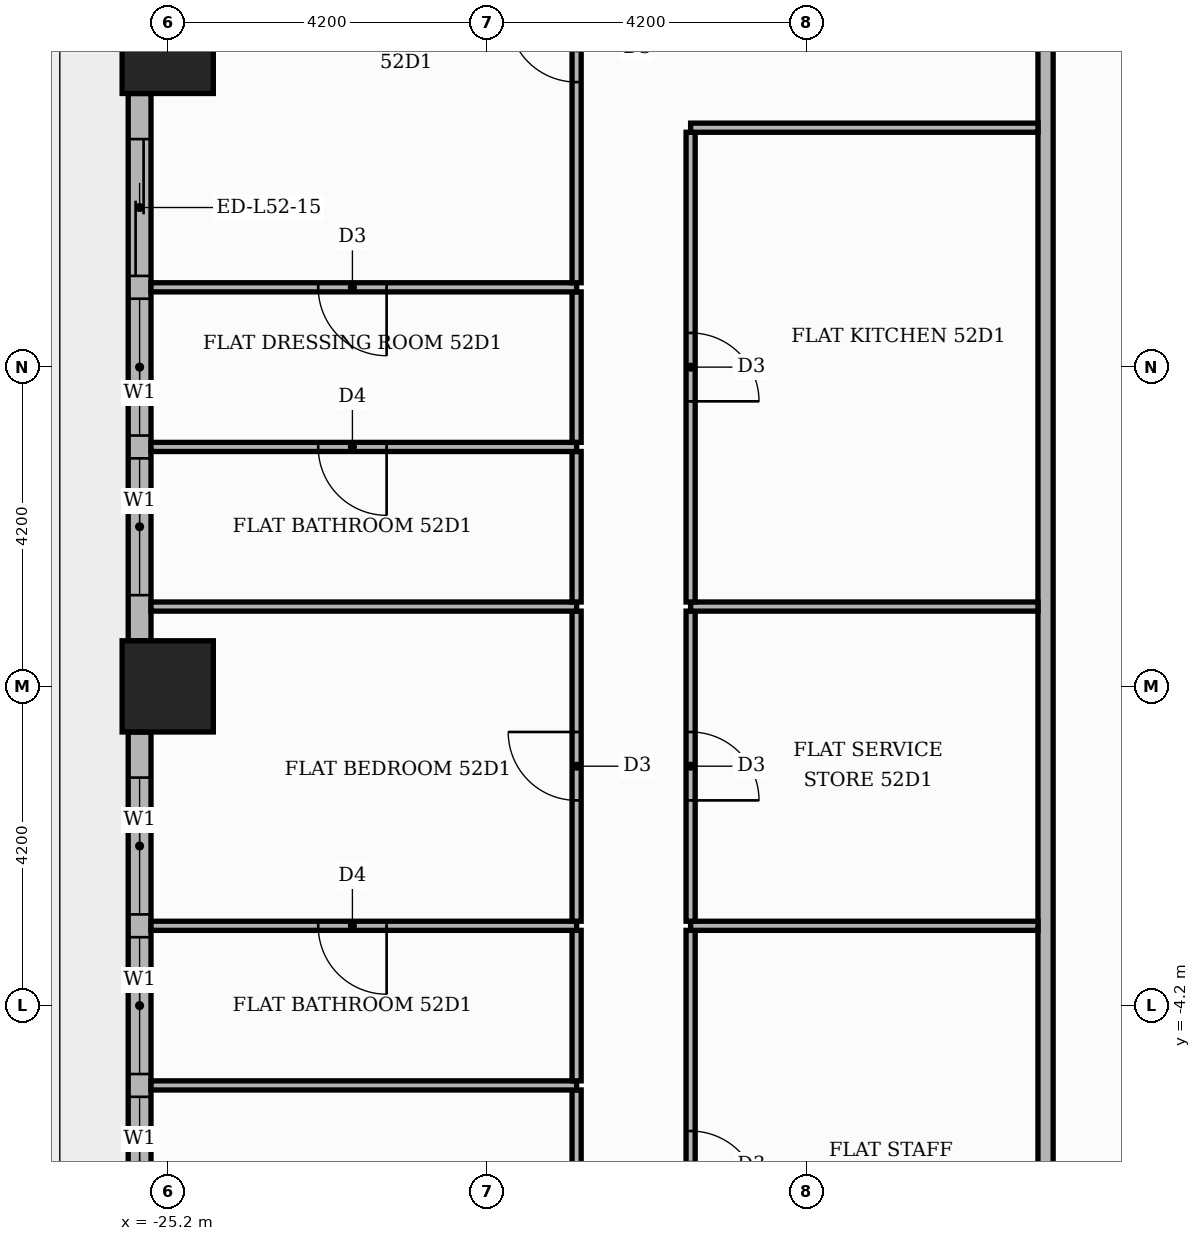
"""IFC4 building model, lengths in metres.
Left out: names, types, materials, properties, quantities, classifications, styles, units other than length and angle.
Written with IfcOpenShell. Run it as: python <this file> out.ifc"""

import sys

from ifc_helpers import new_model, si_unit, direction, frame, frame_2d, origin, origin_2d, place, context, subcontext, project, spatial, rectangle, extrude, element, fill, save


model = new_model("IFC4")
c1 = context("Model", 3, precision=1e-05, world=origin(), true_north=direction((0.0, 1.0)))
c2 = subcontext(c1, "Body", "Model", "MODEL_VIEW")
j1 = project(units=[si_unit("LENGTHUNIT", "METRE"), si_unit("PLANEANGLEUNIT", "RADIAN")], contexts=[c1])
p1 = place(None, origin())
s1 = spatial("IfcSite", under=j1, at=p1, CompositionType="ELEMENT")
p2 = place(p1, origin())
s2 = spatial("IfcBuilding", under=s1, at=p2, CompositionType="ELEMENT")
p3 = place(p2, frame((0.0, 0.0, 219.6)))
s3 = spatial("IfcBuildingStorey", under=s2, at=p3, CompositionType="ELEMENT", Elevation=219.6)
for number, where, z_axis, x_axis in (
    (1, (-25.2, 0.0, 0.0), (0.0, 0.0, 1.0), (1.0, 0.0, 0.0)),
    (2, (-25.2, 8.4, 0.0), (0.0, 0.0, 1.0), (1.0, 0.0, 0.0)),
):
    element("IfcColumn", number, at=place(p3, frame(where, z_axis=z_axis, x_axis=x_axis)), inside=s3, PredefinedType="COLUMN", context=c2, shape_type="SweptSolid", body=[
        extrude(rectangle(XDim=1.2, YDim=1.2, at=origin_2d()), origin(), (0.0, 0.0, 1.0), 3.9),
    ])
p4 = place(p3, frame((-25.57, 7.8, 0.0), z_axis=(0.0, 0.0, 1.0), x_axis=(0.0, -1.0, 0.0)))
e3 = element("IfcWall", 3, at=p4, inside=s3, PredefinedType="STANDARD", context=c2, shape_type="SweptSolid", body=[
    extrude(rectangle(XDim=7.2, YDim=0.3, at=frame_2d((3.6, 0.0))), origin(), (0.0, 0.0, 1.0), 3.48),
])
p5 = place(p4, frame((0.6, 0.0, 0.0)))
e4 = element("IfcOpeningElement", 4, at=p5, cuts=e3, PredefinedType="OPENING", context=c2, shape_type="SweptSolid", body=[
    extrude(rectangle(XDim=1.8, YDim=2.4, at=frame_2d((0.9, 1.2))), frame((0.0, 0.16, 0.0), z_axis=(0.0, -1.0, 0.0), x_axis=(1.0, 0.0, 0.0)), (0.0, 0.0, 1.0), 0.32),
])
p6 = place(p4, frame((2.7, 0.0, 0.9)))
e5 = element("IfcOpeningElement", 5, at=p6, cuts=e3, PredefinedType="OPENING", context=c2, shape_type="SweptSolid", body=[
    extrude(rectangle(XDim=1.8, YDim=2.1, at=frame_2d((0.9, 1.05))), frame((0.0, 0.16, 0.0), z_axis=(0.0, -1.0, 0.0), x_axis=(1.0, 0.0, 0.0)), (0.0, 0.0, 1.0), 0.32),
])
p7 = place(p4, frame((4.8, 0.0, 0.9)))
e6 = element("IfcOpeningElement", 6, at=p7, cuts=e3, PredefinedType="OPENING", context=c2, shape_type="SweptSolid", body=[
    extrude(rectangle(XDim=1.8, YDim=2.1, at=frame_2d((0.9, 1.05))), frame((0.0, 0.16, 0.0), z_axis=(0.0, -1.0, 0.0), x_axis=(1.0, 0.0, 0.0)), (0.0, 0.0, 1.0), 0.32),
])
p8 = place(p3, frame((-25.57, -0.6, 0.0), z_axis=(0.0, 0.0, 1.0), x_axis=(0.0, -1.0, 0.0)))
e7 = element("IfcWall", 7, at=p8, inside=s3, PredefinedType="STANDARD", context=c2, shape_type="SweptSolid", body=[
    extrude(rectangle(XDim=7.2, YDim=0.3, at=frame_2d((3.6, 0.0))), origin(), (0.0, 0.0, 1.0), 3.48),
])
p9 = place(p8, frame((0.6, 0.0, 0.9)))
e8 = element("IfcOpeningElement", 8, at=p9, cuts=e7, PredefinedType="OPENING", context=c2, shape_type="SweptSolid", body=[
    extrude(rectangle(XDim=1.8, YDim=2.1, at=frame_2d((0.9, 1.05))), frame((0.0, 0.16, 0.0), z_axis=(0.0, -1.0, 0.0), x_axis=(1.0, 0.0, 0.0)), (0.0, 0.0, 1.0), 0.32),
])
p10 = place(p8, frame((2.7, 0.0, 0.9)))
e9 = element("IfcOpeningElement", 9, at=p10, cuts=e7, PredefinedType="OPENING", context=c2, shape_type="SweptSolid", body=[
    extrude(rectangle(XDim=1.8, YDim=2.1, at=frame_2d((0.9, 1.05))), frame((0.0, 0.16, 0.0), z_axis=(0.0, -1.0, 0.0), x_axis=(1.0, 0.0, 0.0)), (0.0, 0.0, 1.0), 0.32),
])
p11 = place(p8, frame((4.8, 0.0, 0.9)))
e10 = element("IfcOpeningElement", 10, at=p11, cuts=e7, PredefinedType="OPENING", context=c2, shape_type="SweptSolid", body=[
    extrude(rectangle(XDim=1.8, YDim=2.1, at=frame_2d((0.9, 1.05))), frame((0.0, 0.16, 0.0), z_axis=(0.0, -1.0, 0.0), x_axis=(1.0, 0.0, 0.0)), (0.0, 0.0, 1.0), 0.32),
])
p12 = place(p3, frame((-13.65, -13.55, 0.0), z_axis=(0.0, 0.0, 1.0), x_axis=(0.0, 1.0, 0.0)))
e11 = element("IfcWall", 11, at=p12, inside=s3, PredefinedType="PARTITIONING", context=c2, shape_type="SweptSolid", body=[
    extrude(rectangle(XDim=27.1, YDim=0.2, at=frame_2d((13.55, 0.0))), origin(), (0.0, 0.0, 1.0), 3.48),
])
p13 = place(p12, frame((23.5, 0.0, 0.0)))
e12 = element("IfcOpeningElement", 12, at=p13, cuts=e11, PredefinedType="OPENING", context=c2, shape_type="SweptSolid", body=[
    extrude(rectangle(XDim=1.1, YDim=2.4, at=frame_2d((0.55, 1.2))), frame((0.0, 0.11, 0.0), z_axis=(0.0, -1.0, 0.0), x_axis=(1.0, 0.0, 0.0)), (0.0, 0.0, 1.0), 0.22),
])
p14 = place(p3, frame((-19.82, -11.49, 0.0), z_axis=(0.0, 0.0, 1.0), x_axis=(0.0, 1.0, 0.0)))
e13 = element("IfcWall", 13, at=p14, inside=s3, PredefinedType="PARTITIONING", context=c2, shape_type="SweptSolid", body=[
    extrude(rectangle(XDim=6.18, YDim=0.12, at=frame_2d((3.09, 0.0))), origin(), (0.0, 0.0, 1.0), 3.48),
])
p15 = place(p14, frame((2.64, 0.0, 0.0)))
e14 = element("IfcOpeningElement", 14, at=p15, cuts=e13, PredefinedType="OPENING", context=c2, shape_type="SweptSolid", body=[
    extrude(rectangle(XDim=0.9, YDim=2.1, at=frame_2d((0.45, 1.05))), frame((0.0, 0.07, 0.0), z_axis=(0.0, -1.0, 0.0), x_axis=(1.0, 0.0, 0.0)), (0.0, 0.0, 1.0), 0.14),
])
p16 = place(p3, frame((-18.32, -9.39, 0.0), z_axis=(0.0, 0.0, 1.0), x_axis=(0.0, 1.0, 0.0)))
e15 = element("IfcWall", 15, at=p16, inside=s3, PredefinedType="PARTITIONING", context=c2, shape_type="SweptSolid", body=[
    extrude(rectangle(XDim=6.18, YDim=0.12, at=frame_2d((3.09, 0.0))), origin(), (0.0, 0.0, 1.0), 3.48),
])
p17 = place(p16, frame((2.64, 0.0, 0.0)))
e16 = element("IfcOpeningElement", 16, at=p17, cuts=e15, PredefinedType="OPENING", context=c2, shape_type="SweptSolid", body=[
    extrude(rectangle(XDim=0.9, YDim=2.1, at=frame_2d((0.45, 1.05))), frame((0.0, 0.07, 0.0), z_axis=(0.0, -1.0, 0.0), x_axis=(1.0, 0.0, 0.0)), (0.0, 0.0, 1.0), 0.14),
])
p18 = place(p3, frame((-25.42, -5.25, 0.0), z_axis=(0.0, 0.0, 1.0), x_axis=(1.0, 0.0, 0.0)))
e17 = element("IfcWall", 17, at=p18, inside=s3, PredefinedType="PARTITIONING", context=c2, shape_type="SweptSolid", body=[
    extrude(rectangle(XDim=5.6, YDim=0.12, at=frame_2d((2.8, 0.0))), origin(), (0.0, 0.0, 1.0), 3.48),
])
p19 = place(p3, frame((-19.82, -5.19, 0.0), z_axis=(0.0, 0.0, 1.0), x_axis=(0.0, 1.0, 0.0)))
e18 = element("IfcWall", 18, at=p19, inside=s3, PredefinedType="PARTITIONING", context=c2, shape_type="SweptSolid", body=[
    extrude(rectangle(XDim=1.98, YDim=0.12, at=frame_2d((0.99, 0.0))), origin(), (0.0, 0.0, 1.0), 3.48),
])
p20 = place(p3, frame((-25.42, -3.15, 0.0), z_axis=(0.0, 0.0, 1.0), x_axis=(1.0, 0.0, 0.0)))
e19 = element("IfcWall", 19, at=p20, inside=s3, PredefinedType="PARTITIONING", context=c2, shape_type="SweptSolid", body=[
    extrude(rectangle(XDim=5.6, YDim=0.12, at=frame_2d((2.8, 0.0))), origin(), (0.0, 0.0, 1.0), 3.48),
])
p21 = place(p20, frame((2.2, 0.0, 0.0)))
e20 = element("IfcOpeningElement", 20, at=p21, cuts=e19, PredefinedType="OPENING", context=c2, shape_type="SweptSolid", body=[
    extrude(rectangle(XDim=0.9, YDim=2.1, at=frame_2d((0.45, 1.05))), frame((0.0, 0.07, 0.0), z_axis=(0.0, -1.0, 0.0), x_axis=(1.0, 0.0, 0.0)), (0.0, 0.0, 1.0), 0.14),
])
p22 = place(p3, frame((-18.32, -3.15, 0.0), z_axis=(0.0, 0.0, 1.0), x_axis=(1.0, 0.0, 0.0)))
e21 = element("IfcWall", 21, at=p22, inside=s3, PredefinedType="PARTITIONING", context=c2, shape_type="SweptSolid", body=[
    extrude(rectangle(XDim=4.57, YDim=0.12, at=frame_2d((2.285, 0.0))), origin(), (0.0, 0.0, 1.0), 3.48),
])
p23 = place(p3, frame((-19.82, -3.09, 0.0), z_axis=(0.0, 0.0, 1.0), x_axis=(0.0, 1.0, 0.0)))
e22 = element("IfcWall", 22, at=p23, inside=s3, PredefinedType="PARTITIONING", context=c2, shape_type="SweptSolid", body=[
    extrude(rectangle(XDim=4.08, YDim=0.12, at=frame_2d((2.04, 0.0))), origin(), (0.0, 0.0, 1.0), 3.48),
])
p24 = place(p23, frame((1.59, 0.0, 0.0)))
e23 = element("IfcOpeningElement", 23, at=p24, cuts=e22, PredefinedType="OPENING", context=c2, shape_type="SweptSolid", body=[
    extrude(rectangle(XDim=0.9, YDim=2.1, at=frame_2d((0.45, 1.05))), frame((0.0, 0.07, 0.0), z_axis=(0.0, -1.0, 0.0), x_axis=(1.0, 0.0, 0.0)), (0.0, 0.0, 1.0), 0.14),
])
p25 = place(p3, frame((-18.32, -3.09, 0.0), z_axis=(0.0, 0.0, 1.0), x_axis=(0.0, 1.0, 0.0)))
e24 = element("IfcWall", 24, at=p25, inside=s3, PredefinedType="PARTITIONING", context=c2, shape_type="SweptSolid", body=[
    extrude(rectangle(XDim=4.08, YDim=0.12, at=frame_2d((2.04, 0.0))), origin(), (0.0, 0.0, 1.0), 3.48),
])
p26 = place(p25, frame((1.59, 0.0, 0.0)))
e25 = element("IfcOpeningElement", 25, at=p26, cuts=e24, PredefinedType="OPENING", context=c2, shape_type="SweptSolid", body=[
    extrude(rectangle(XDim=0.9, YDim=2.1, at=frame_2d((0.45, 1.05))), frame((0.0, 0.07, 0.0), z_axis=(0.0, -1.0, 0.0), x_axis=(1.0, 0.0, 0.0)), (0.0, 0.0, 1.0), 0.14),
])
p27 = place(p3, frame((-25.42, 1.05, 0.0), z_axis=(0.0, 0.0, 1.0), x_axis=(1.0, 0.0, 0.0)))
e26 = element("IfcWall", 26, at=p27, inside=s3, PredefinedType="PARTITIONING", context=c2, shape_type="SweptSolid", body=[
    extrude(rectangle(XDim=5.6, YDim=0.12, at=frame_2d((2.8, 0.0))), origin(), (0.0, 0.0, 1.0), 3.48),
])
p28 = place(p3, frame((-18.32, 1.05, 0.0), z_axis=(0.0, 0.0, 1.0), x_axis=(1.0, 0.0, 0.0)))
e27 = element("IfcWall", 27, at=p28, inside=s3, PredefinedType="PARTITIONING", context=c2, shape_type="SweptSolid", body=[
    extrude(rectangle(XDim=4.57, YDim=0.12, at=frame_2d((2.285, 0.0))), origin(), (0.0, 0.0, 1.0), 3.48),
])
p29 = place(p3, frame((-19.82, 1.11, 0.0), z_axis=(0.0, 0.0, 1.0), x_axis=(0.0, 1.0, 0.0)))
e28 = element("IfcWall", 28, at=p29, inside=s3, PredefinedType="PARTITIONING", context=c2, shape_type="SweptSolid", body=[
    extrude(rectangle(XDim=1.98, YDim=0.12, at=frame_2d((0.99, 0.0))), origin(), (0.0, 0.0, 1.0), 3.48),
])
p30 = place(p3, frame((-18.32, 1.11, 0.0), z_axis=(0.0, 0.0, 1.0), x_axis=(0.0, 1.0, 0.0)))
e29 = element("IfcWall", 29, at=p30, inside=s3, PredefinedType="PARTITIONING", context=c2, shape_type="SweptSolid", body=[
    extrude(rectangle(XDim=6.18, YDim=0.12, at=frame_2d((3.09, 0.0))), origin(), (0.0, 0.0, 1.0), 3.48),
])
p31 = place(p30, frame((2.64, 0.0, 0.0)))
e30 = element("IfcOpeningElement", 30, at=p31, cuts=e29, PredefinedType="OPENING", context=c2, shape_type="SweptSolid", body=[
    extrude(rectangle(XDim=0.9, YDim=2.1, at=frame_2d((0.45, 1.05))), frame((0.0, 0.07, 0.0), z_axis=(0.0, -1.0, 0.0), x_axis=(1.0, 0.0, 0.0)), (0.0, 0.0, 1.0), 0.14),
])
p32 = place(p3, frame((-25.42, 3.15, 0.0), z_axis=(0.0, 0.0, 1.0), x_axis=(1.0, 0.0, 0.0)))
e31 = element("IfcWall", 31, at=p32, inside=s3, PredefinedType="PARTITIONING", context=c2, shape_type="SweptSolid", body=[
    extrude(rectangle(XDim=5.6, YDim=0.12, at=frame_2d((2.8, 0.0))), origin(), (0.0, 0.0, 1.0), 3.48),
])
p33 = place(p32, frame((2.2, 0.0, 0.0)))
e32 = element("IfcOpeningElement", 32, at=p33, cuts=e31, PredefinedType="OPENING", context=c2, shape_type="SweptSolid", body=[
    extrude(rectangle(XDim=0.9, YDim=2.1, at=frame_2d((0.45, 1.05))), frame((0.0, 0.07, 0.0), z_axis=(0.0, -1.0, 0.0), x_axis=(1.0, 0.0, 0.0)), (0.0, 0.0, 1.0), 0.14),
])
p34 = place(p3, frame((-19.82, 3.21, 0.0), z_axis=(0.0, 0.0, 1.0), x_axis=(0.0, 1.0, 0.0)))
e33 = element("IfcWall", 33, at=p34, inside=s3, PredefinedType="PARTITIONING", context=c2, shape_type="SweptSolid", body=[
    extrude(rectangle(XDim=1.98, YDim=0.12, at=frame_2d((0.99, 0.0))), origin(), (0.0, 0.0, 1.0), 3.48),
])
p35 = place(p3, frame((-25.42, 5.25, 0.0), z_axis=(0.0, 0.0, 1.0), x_axis=(1.0, 0.0, 0.0)))
e34 = element("IfcWall", 34, at=p35, inside=s3, PredefinedType="PARTITIONING", context=c2, shape_type="SweptSolid", body=[
    extrude(rectangle(XDim=5.6, YDim=0.12, at=frame_2d((2.8, 0.0))), origin(), (0.0, 0.0, 1.0), 3.48),
])
p36 = place(p35, frame((2.2, 0.0, 0.0)))
e35 = element("IfcOpeningElement", 35, at=p36, cuts=e34, PredefinedType="OPENING", context=c2, shape_type="SweptSolid", body=[
    extrude(rectangle(XDim=0.9, YDim=2.1, at=frame_2d((0.45, 1.05))), frame((0.0, 0.07, 0.0), z_axis=(0.0, -1.0, 0.0), x_axis=(1.0, 0.0, 0.0)), (0.0, 0.0, 1.0), 0.14),
])
p37 = place(p3, frame((-19.82, 5.31, 0.0), z_axis=(0.0, 0.0, 1.0), x_axis=(0.0, 1.0, 0.0)))
e36 = element("IfcWall", 36, at=p37, inside=s3, PredefinedType="PARTITIONING", context=c2, shape_type="SweptSolid", body=[
    extrude(rectangle(XDim=6.18, YDim=0.12, at=frame_2d((3.09, 0.0))), origin(), (0.0, 0.0, 1.0), 3.48),
])
p38 = place(p37, frame((2.64, 0.0, 0.0)))
e37 = element("IfcOpeningElement", 37, at=p38, cuts=e36, PredefinedType="OPENING", context=c2, shape_type="SweptSolid", body=[
    extrude(rectangle(XDim=0.9, YDim=2.1, at=frame_2d((0.45, 1.05))), frame((0.0, 0.07, 0.0), z_axis=(0.0, -1.0, 0.0), x_axis=(1.0, 0.0, 0.0)), (0.0, 0.0, 1.0), 0.14),
])
p39 = place(p3, frame((-18.32, 7.35, 0.0), z_axis=(0.0, 0.0, 1.0), x_axis=(1.0, 0.0, 0.0)))
e38 = element("IfcWall", 38, at=p39, inside=s3, PredefinedType="PARTITIONING", context=c2, shape_type="SweptSolid", body=[
    extrude(rectangle(XDim=4.57, YDim=0.12, at=frame_2d((2.285, 0.0))), origin(), (0.0, 0.0, 1.0), 3.48),
])
p40 = place(p5, origin())
e39 = element("IfcDoor", 39, at=p40, inside=s3, OperationType="SLIDING_TO_LEFT", PredefinedType="DOOR", context=c2, shape_type="SweptSolid", body=[
    extrude(rectangle(XDim=1.8, YDim=2.4, at=frame_2d((0.9, 1.2))), frame((0.0, 0.025, 0.0), z_axis=(0.0, -1.0, 0.0), x_axis=(1.0, 0.0, 0.0)), (0.0, 0.0, 1.0), 0.05),
])
fill(e4, e39)
p41 = place(p6, origin())
e40 = element("IfcWindow", 40, at=p41, inside=s3, PartitioningType="SINGLE_PANEL", PredefinedType="WINDOW", context=c2, shape_type="SweptSolid", body=[
    extrude(rectangle(XDim=1.8, YDim=2.1, at=frame_2d((0.9, 1.05))), frame((0.0, 0.03, 0.0), z_axis=(0.0, -1.0, 0.0), x_axis=(1.0, 0.0, 0.0)), (0.0, 0.0, 1.0), 0.06),
])
fill(e5, e40)
p42 = place(p7, origin())
e41 = element("IfcWindow", 41, at=p42, inside=s3, PartitioningType="SINGLE_PANEL", PredefinedType="WINDOW", context=c2, shape_type="SweptSolid", body=[
    extrude(rectangle(XDim=1.8, YDim=2.1, at=frame_2d((0.9, 1.05))), frame((0.0, 0.03, 0.0), z_axis=(0.0, -1.0, 0.0), x_axis=(1.0, 0.0, 0.0)), (0.0, 0.0, 1.0), 0.06),
])
fill(e6, e41)
p43 = place(p9, origin())
e42 = element("IfcWindow", 42, at=p43, inside=s3, PartitioningType="SINGLE_PANEL", PredefinedType="WINDOW", context=c2, shape_type="SweptSolid", body=[
    extrude(rectangle(XDim=1.8, YDim=2.1, at=frame_2d((0.9, 1.05))), frame((0.0, 0.03, 0.0), z_axis=(0.0, -1.0, 0.0), x_axis=(1.0, 0.0, 0.0)), (0.0, 0.0, 1.0), 0.06),
])
fill(e8, e42)
p44 = place(p10, origin())
e43 = element("IfcWindow", 43, at=p44, inside=s3, PartitioningType="SINGLE_PANEL", PredefinedType="WINDOW", context=c2, shape_type="SweptSolid", body=[
    extrude(rectangle(XDim=1.8, YDim=2.1, at=frame_2d((0.9, 1.05))), frame((0.0, 0.03, 0.0), z_axis=(0.0, -1.0, 0.0), x_axis=(1.0, 0.0, 0.0)), (0.0, 0.0, 1.0), 0.06),
])
fill(e9, e43)
p45 = place(p11, origin())
e44 = element("IfcWindow", 44, at=p45, inside=s3, PartitioningType="SINGLE_PANEL", PredefinedType="WINDOW", context=c2, shape_type="SweptSolid", body=[
    extrude(rectangle(XDim=1.8, YDim=2.1, at=frame_2d((0.9, 1.05))), frame((0.0, 0.03, 0.0), z_axis=(0.0, -1.0, 0.0), x_axis=(1.0, 0.0, 0.0)), (0.0, 0.0, 1.0), 0.06),
])
fill(e10, e44)
p46 = place(p31, frame((0.9, 0.0, 0.0), z_axis=(0.0, 0.0, 1.0), x_axis=(-1.0, 0.0, 0.0)))
e45 = element("IfcDoor", 45, at=p46, inside=s3, OperationType="SINGLE_SWING_LEFT", PredefinedType="DOOR", context=c2, shape_type="SweptSolid", body=[
    extrude(rectangle(XDim=0.9, YDim=2.1, at=frame_2d((0.45, 1.05))), frame((0.0, 0.025, 0.0), z_axis=(0.0, -1.0, 0.0), x_axis=(1.0, 0.0, 0.0)), (0.0, 0.0, 1.0), 0.05),
])
fill(e30, e45)
p47 = place(p26, frame((0.9, 0.0, 0.0), z_axis=(0.0, 0.0, 1.0), x_axis=(-1.0, 0.0, 0.0)))
e46 = element("IfcDoor", 46, at=p47, inside=s3, OperationType="SINGLE_SWING_LEFT", PredefinedType="DOOR", context=c2, shape_type="SweptSolid", body=[
    extrude(rectangle(XDim=0.9, YDim=2.1, at=frame_2d((0.45, 1.05))), frame((0.0, 0.025, 0.0), z_axis=(0.0, -1.0, 0.0), x_axis=(1.0, 0.0, 0.0)), (0.0, 0.0, 1.0), 0.05),
])
fill(e25, e46)
p48 = place(p17, frame((0.9, 0.0, 0.0), z_axis=(0.0, 0.0, 1.0), x_axis=(-1.0, 0.0, 0.0)))
e47 = element("IfcDoor", 47, at=p48, inside=s3, OperationType="SINGLE_SWING_LEFT", PredefinedType="DOOR", context=c2, shape_type="SweptSolid", body=[
    extrude(rectangle(XDim=0.9, YDim=2.1, at=frame_2d((0.45, 1.05))), frame((0.0, 0.025, 0.0), z_axis=(0.0, -1.0, 0.0), x_axis=(1.0, 0.0, 0.0)), (0.0, 0.0, 1.0), 0.05),
])
fill(e16, e47)
p49 = place(p38, origin())
e48 = element("IfcDoor", 48, at=p49, inside=s3, OperationType="SINGLE_SWING_RIGHT", PredefinedType="DOOR", context=c2, shape_type="SweptSolid", body=[
    extrude(rectangle(XDim=0.9, YDim=2.1, at=frame_2d((0.45, 1.05))), frame((0.0, 0.025, 0.0), z_axis=(0.0, -1.0, 0.0), x_axis=(1.0, 0.0, 0.0)), (0.0, 0.0, 1.0), 0.05),
])
fill(e37, e48)
p50 = place(p36, frame((0.9, 0.0, 0.0), z_axis=(0.0, 0.0, 1.0), x_axis=(-1.0, 0.0, 0.0)))
e49 = element("IfcDoor", 49, at=p50, inside=s3, OperationType="SINGLE_SWING_RIGHT", PredefinedType="DOOR", context=c2, shape_type="SweptSolid", body=[
    extrude(rectangle(XDim=0.9, YDim=2.1, at=frame_2d((0.45, 1.05))), frame((0.0, 0.025, 0.0), z_axis=(0.0, -1.0, 0.0), x_axis=(1.0, 0.0, 0.0)), (0.0, 0.0, 1.0), 0.05),
])
fill(e35, e49)
p51 = place(p33, frame((0.9, 0.0, 0.0), z_axis=(0.0, 0.0, 1.0), x_axis=(-1.0, 0.0, 0.0)))
e50 = element("IfcDoor", 50, at=p51, inside=s3, OperationType="SINGLE_SWING_RIGHT", PredefinedType="DOOR", context=c2, shape_type="SweptSolid", body=[
    extrude(rectangle(XDim=0.9, YDim=2.1, at=frame_2d((0.45, 1.05))), frame((0.0, 0.025, 0.0), z_axis=(0.0, -1.0, 0.0), x_axis=(1.0, 0.0, 0.0)), (0.0, 0.0, 1.0), 0.05),
])
fill(e32, e50)
p52 = place(p24, origin())
e51 = element("IfcDoor", 51, at=p52, inside=s3, OperationType="SINGLE_SWING_RIGHT", PredefinedType="DOOR", context=c2, shape_type="SweptSolid", body=[
    extrude(rectangle(XDim=0.9, YDim=2.1, at=frame_2d((0.45, 1.05))), frame((0.0, 0.025, 0.0), z_axis=(0.0, -1.0, 0.0), x_axis=(1.0, 0.0, 0.0)), (0.0, 0.0, 1.0), 0.05),
])
fill(e23, e51)
p53 = place(p21, frame((0.9, 0.0, 0.0), z_axis=(0.0, 0.0, 1.0), x_axis=(-1.0, 0.0, 0.0)))
e52 = element("IfcDoor", 52, at=p53, inside=s3, OperationType="SINGLE_SWING_RIGHT", PredefinedType="DOOR", context=c2, shape_type="SweptSolid", body=[
    extrude(rectangle(XDim=0.9, YDim=2.1, at=frame_2d((0.45, 1.05))), frame((0.0, 0.025, 0.0), z_axis=(0.0, -1.0, 0.0), x_axis=(1.0, 0.0, 0.0)), (0.0, 0.0, 1.0), 0.05),
])
fill(e20, e52)
save(model, sys.argv[1])
